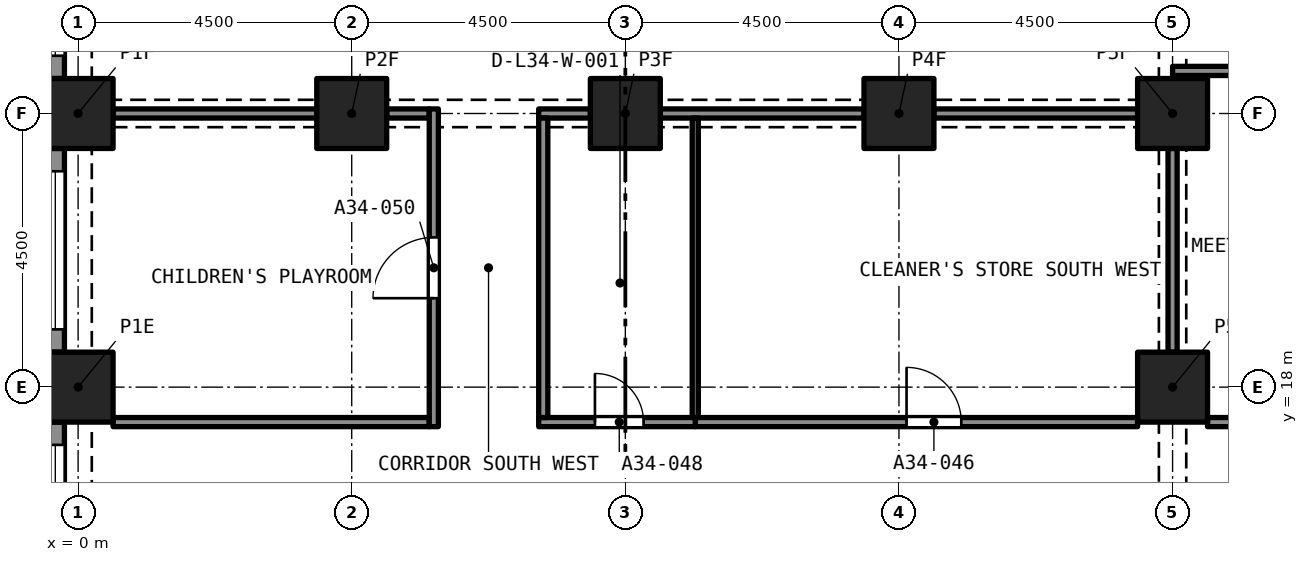
"""IFC4 building model, lengths in metres.
Left out: names, types, materials, properties, quantities, classifications, styles, units other than length and angle.
Written with IfcOpenShell. Run it as: python <this file> out.ifc"""

import sys

from ifc_helpers import new_model, si_unit, direction, frame, frame_2d, origin, origin_2d, place, context, subcontext, project, spatial, rectangle, extrude, element, fill, save


model = new_model("IFC4")
c1 = context("Model", 3, precision=1e-05, world=origin(), true_north=direction((0.0, 1.0)))
c2 = subcontext(c1, "Body", "Model", "MODEL_VIEW")
j1 = project(units=[si_unit("LENGTHUNIT", "METRE"), si_unit("PLANEANGLEUNIT", "RADIAN")], contexts=[c1])
p1 = place(None, origin())
s1 = spatial("IfcSite", under=j1, at=p1, CompositionType="ELEMENT")
p2 = place(p1, origin())
s2 = spatial("IfcBuilding", under=s1, at=p2, CompositionType="ELEMENT")
p3 = place(p2, frame((0.0, 0.0, 121.6)))
s3 = spatial("IfcBuildingStorey", under=s2, at=p3, CompositionType="ELEMENT", Elevation=121.6)
for number, where, z_axis, x_axis in (
    (1, (0.0, 18.0, 0.0), (0.0, 0.0, 1.0), (1.0, 0.0, 0.0)),
    (2, (18.0, 18.0, 0.0), (0.0, 0.0, 1.0), (1.0, 0.0, 0.0)),
    (3, (0.0, 22.5, 0.0), (0.0, 0.0, 1.0), (1.0, 0.0, 0.0)),
    (4, (4.5, 22.5, 0.0), (0.0, 0.0, 1.0), (1.0, 0.0, 0.0)),
    (5, (9.0, 22.5, 0.0), (0.0, 0.0, 1.0), (1.0, 0.0, 0.0)),
    (6, (13.5, 22.5, 0.0), (0.0, 0.0, 1.0), (1.0, 0.0, 0.0)),
    (7, (18.0, 22.5, 0.0), (0.0, 0.0, 1.0), (1.0, 0.0, 0.0)),
):
    element("IfcColumn", number, at=place(p3, frame(where, z_axis=z_axis, x_axis=x_axis)), inside=s3, PredefinedType="COLUMN", context=c2, shape_type="SweptSolid", body=[
        extrude(rectangle(XDim=1.15, YDim=1.15, at=origin_2d()), origin(), (0.0, 0.0, 1.0), 3.2),
    ])
p4 = place(p3, frame((-0.375, 23.075, 0.0), z_axis=(0.0, 0.0, 1.0), x_axis=(0.0, 1.0, 0.0)))
e8 = element("IfcWall", 8, at=p4, inside=s3, PredefinedType="SOLIDWALL", context=c2, shape_type="SweptSolid", body=[
    extrude(rectangle(XDim=3.35, YDim=0.3, at=frame_2d((1.675, 0.0))), origin(), (0.0, 0.0, 1.0), 3.2),
])
p5 = place(p4, frame((0.375, 0.0, 0.45)))
e9 = element("IfcOpeningElement", 9, at=p5, cuts=e8, PredefinedType="OPENING", context=c2, shape_type="SweptSolid", body=[
    extrude(rectangle(XDim=2.6, YDim=1.95, at=frame_2d((1.3, 0.975))), frame((0.0, 0.16, 0.0), z_axis=(0.0, -1.0, 0.0), x_axis=(1.0, 0.0, 0.0)), (0.0, 0.0, 1.0), 0.32),
])
p6 = place(p3, frame((-0.375, 18.575, 0.0), z_axis=(0.0, 0.0, 1.0), x_axis=(0.0, 1.0, 0.0)))
e10 = element("IfcWall", 10, at=p6, inside=s3, PredefinedType="SOLIDWALL", context=c2, shape_type="SweptSolid", body=[
    extrude(rectangle(XDim=3.35, YDim=0.3, at=frame_2d((1.675, 0.0))), origin(), (0.0, 0.0, 1.0), 3.2),
])
p7 = place(p6, frame((0.375, 0.0, 0.45)))
e11 = element("IfcOpeningElement", 11, at=p7, cuts=e10, PredefinedType="OPENING", context=c2, shape_type="SweptSolid", body=[
    extrude(rectangle(XDim=2.6, YDim=1.95, at=frame_2d((1.3, 0.975))), frame((0.0, 0.16, 0.0), z_axis=(0.0, -1.0, 0.0), x_axis=(1.0, 0.0, 0.0)), (0.0, 0.0, 1.0), 0.32),
])
p8 = place(p3, frame((-0.375, 14.075, 0.0), z_axis=(0.0, 0.0, 1.0), x_axis=(0.0, 1.0, 0.0)))
e12 = element("IfcWall", 12, at=p8, inside=s3, PredefinedType="SOLIDWALL", context=c2, shape_type="SweptSolid", body=[
    extrude(rectangle(XDim=3.35, YDim=0.3, at=frame_2d((1.675, 0.0))), origin(), (0.0, 0.0, 1.0), 3.2),
])
p9 = place(p8, frame((0.375, 0.0, 0.45)))
e13 = element("IfcOpeningElement", 13, at=p9, cuts=e12, PredefinedType="OPENING", context=c2, shape_type="SweptSolid", body=[
    extrude(rectangle(XDim=2.6, YDim=1.95, at=frame_2d((1.3, 0.975))), frame((0.0, 0.16, 0.0), z_axis=(0.0, -1.0, 0.0), x_axis=(1.0, 0.0, 0.0)), (0.0, 0.0, 1.0), 0.32),
])
p10 = place(p3, frame((18.575, 17.425, 0.0), z_axis=(0.0, 0.0, 1.0), x_axis=(1.0, 0.0, 0.0)))
e14 = element("IfcWall", 14, at=p10, inside=s3, PredefinedType="PARTITIONING", context=c2, shape_type="SweptSolid", body=[
    extrude(rectangle(XDim=5.2, YDim=0.15, at=frame_2d((2.6, 0.0))), origin(), (0.0, 0.0, 1.0), 2.75),
])
p11 = place(p3, frame((10.15, 17.425, 0.0), z_axis=(0.0, 0.0, 1.0), x_axis=(1.0, 0.0, 0.0)))
e15 = element("IfcWall", 15, at=p11, inside=s3, PredefinedType="PARTITIONING", context=c2, shape_type="SweptSolid", body=[
    extrude(rectangle(XDim=7.275, YDim=0.15, at=frame_2d((3.638, 0.0))), origin(), (0.0, 0.0, 1.0), 2.85),
])
p12 = place(p11, frame((3.475, 0.0, 0.0)))
e16 = element("IfcOpeningElement", 16, at=p12, cuts=e15, PredefinedType="OPENING", context=c2, shape_type="SweptSolid", body=[
    extrude(rectangle(XDim=0.9, YDim=2.1, at=frame_2d((0.45, 1.05))), frame((0.0, 0.085, 0.0), z_axis=(0.0, -1.0, 0.0), x_axis=(1.0, 0.0, 0.0)), (0.0, 0.0, 1.0), 0.17),
])
p13 = place(p3, frame((7.575, 17.425, 0.0), z_axis=(0.0, 0.0, 1.0), x_axis=(1.0, 0.0, 0.0)))
e17 = element("IfcWall", 17, at=p13, inside=s3, PredefinedType="PARTITIONING", context=c2, shape_type="SweptSolid", body=[
    extrude(rectangle(XDim=2.575, YDim=0.15, at=frame_2d((1.288, 0.0))), origin(), (0.0, 0.0, 1.0), 2.85),
])
p14 = place(p13, frame((0.925, 0.0, 0.0)))
e18 = element("IfcOpeningElement", 18, at=p14, cuts=e17, PredefinedType="OPENING", context=c2, shape_type="SweptSolid", body=[
    extrude(rectangle(XDim=0.8, YDim=2.1, at=frame_2d((0.4, 1.05))), frame((0.0, 0.085, 0.0), z_axis=(0.0, -1.0, 0.0), x_axis=(1.0, 0.0, 0.0)), (0.0, 0.0, 1.0), 0.17),
])
p15 = place(p3, frame((0.575, 17.425, 0.0), z_axis=(0.0, 0.0, 1.0), x_axis=(1.0, 0.0, 0.0)))
e19 = element("IfcWall", 19, at=p15, inside=s3, PredefinedType="PARTITIONING", context=c2, shape_type="SweptSolid", body=[
    extrude(rectangle(XDim=5.2, YDim=0.15, at=frame_2d((2.6, 0.0))), origin(), (0.0, 0.0, 1.0), 2.85),
])
p16 = place(p3, frame((18.0, 23.2, 0.0), z_axis=(0.0, 0.0, 1.0), x_axis=(1.0, 0.0, 0.0)))
e20 = element("IfcWall", 20, at=p16, inside=s3, PredefinedType="PARTITIONING", context=c2, shape_type="SweptSolid", body=[
    extrude(rectangle(XDim=5.775, YDim=0.15, at=frame_2d((2.887, 0.0))), origin(), (0.0, 0.0, 1.0), 2.75),
])
for number, where, z_axis, x_axis in (
    (21, (18.0, 18.575, 0.0), (0.0, 0.0, 1.0), (0.0, 1.0, 0.0)),
    (22, (14.075, 22.5, 0.0), (0.0, 0.0, 1.0), (1.0, 0.0, 0.0)),
    (23, (9.575, 22.5, 0.0), (0.0, 0.0, 1.0), (1.0, 0.0, 0.0)),
):
    element("IfcWall", number, at=place(p3, frame(where, z_axis=z_axis, x_axis=x_axis)), inside=s3, PredefinedType="PARTITIONING", context=c2, shape_type="SweptSolid", body=[
        extrude(rectangle(XDim=3.35, YDim=0.15, at=frame_2d((1.675, 0.0))), origin(), (0.0, 0.0, 1.0), 2.38),
    ])
p17 = place(p3, frame((7.575, 22.5, 0.0), z_axis=(0.0, 0.0, 1.0), x_axis=(1.0, 0.0, 0.0)))
e24 = element("IfcWall", 24, at=p17, inside=s3, PredefinedType="PARTITIONING", context=c2, shape_type="SweptSolid", body=[
    extrude(rectangle(XDim=0.85, YDim=0.15, at=frame_2d((0.425, 0.0))), origin(), (0.0, 0.0, 1.0), 2.38),
])
p18 = place(p3, frame((5.075, 22.5, 0.0), z_axis=(0.0, 0.0, 1.0), x_axis=(1.0, 0.0, 0.0)))
e25 = element("IfcWall", 25, at=p18, inside=s3, PredefinedType="PARTITIONING", context=c2, shape_type="SweptSolid", body=[
    extrude(rectangle(XDim=0.7, YDim=0.15, at=frame_2d((0.35, 0.0))), origin(), (0.0, 0.0, 1.0), 2.38),
])
p19 = place(p3, frame((0.575, 22.5, 0.0), z_axis=(0.0, 0.0, 1.0), x_axis=(1.0, 0.0, 0.0)))
e26 = element("IfcWall", 26, at=p19, inside=s3, PredefinedType="PARTITIONING", context=c2, shape_type="SweptSolid", body=[
    extrude(rectangle(XDim=3.35, YDim=0.15, at=frame_2d((1.675, 0.0))), origin(), (0.0, 0.0, 1.0), 2.38),
])
p20 = place(p3, frame((7.65, 17.5, 0.0), z_axis=(0.0, 0.0, 1.0), x_axis=(0.0, 1.0, 0.0)))
e27 = element("IfcWall", 27, at=p20, inside=s3, PredefinedType="PARTITIONING", context=c2, shape_type="SweptSolid", body=[
    extrude(rectangle(XDim=4.925, YDim=0.15, at=frame_2d((2.462, 0.0))), origin(), (0.0, 0.0, 1.0), 2.85),
])
p21 = place(p3, frame((5.85, 17.35, 0.0), z_axis=(0.0, 0.0, 1.0), x_axis=(0.0, 1.0, 0.0)))
e28 = element("IfcWall", 28, at=p21, inside=s3, PredefinedType="PARTITIONING", context=c2, shape_type="SweptSolid", body=[
    extrude(rectangle(XDim=5.225, YDim=0.15, at=frame_2d((2.612, 0.0))), origin(), (0.0, 0.0, 1.0), 2.85),
])
p22 = place(p21, frame((2.113, 0.0, 0.0)))
e29 = element("IfcOpeningElement", 29, at=p22, cuts=e28, PredefinedType="OPENING", context=c2, shape_type="SweptSolid", body=[
    extrude(rectangle(XDim=1.0, YDim=2.1, at=frame_2d((0.5, 1.05))), frame((0.0, 0.085, 0.0), z_axis=(0.0, -1.0, 0.0), x_axis=(1.0, 0.0, 0.0)), (0.0, 0.0, 1.0), 0.17),
])
p23 = place(p3, frame((10.15, 17.5, 0.0), z_axis=(0.0, 0.0, 1.0), x_axis=(0.0, 1.0, 0.0)))
e30 = element("IfcWall", 30, at=p23, inside=s3, PredefinedType="PARTITIONING", context=c2, shape_type="SweptSolid", body=[
    extrude(rectangle(XDim=4.925, YDim=0.1, at=frame_2d((2.462, 0.0))), origin(), (0.0, 0.0, 1.0), 2.85),
])
p24 = place(p5, origin())
e31 = element("IfcWindow", 31, at=p24, inside=s3, PartitioningType="SINGLE_PANEL", PredefinedType="WINDOW", context=c2, shape_type="SweptSolid", body=[
    extrude(rectangle(XDim=2.6, YDim=1.95, at=frame_2d((1.3, 0.975))), frame((0.0, 0.03, 0.0), z_axis=(0.0, -1.0, 0.0), x_axis=(1.0, 0.0, 0.0)), (0.0, 0.0, 1.0), 0.06),
])
fill(e9, e31)
p25 = place(p7, origin())
e32 = element("IfcWindow", 32, at=p25, inside=s3, PartitioningType="SINGLE_PANEL", PredefinedType="WINDOW", context=c2, shape_type="SweptSolid", body=[
    extrude(rectangle(XDim=2.6, YDim=1.95, at=frame_2d((1.3, 0.975))), frame((0.0, 0.03, 0.0), z_axis=(0.0, -1.0, 0.0), x_axis=(1.0, 0.0, 0.0)), (0.0, 0.0, 1.0), 0.06),
])
fill(e11, e32)
p26 = place(p9, origin())
e33 = element("IfcWindow", 33, at=p26, inside=s3, PartitioningType="SINGLE_PANEL", PredefinedType="WINDOW", context=c2, shape_type="SweptSolid", body=[
    extrude(rectangle(XDim=2.6, YDim=1.95, at=frame_2d((1.3, 0.975))), frame((0.0, 0.03, 0.0), z_axis=(0.0, -1.0, 0.0), x_axis=(1.0, 0.0, 0.0)), (0.0, 0.0, 1.0), 0.06),
])
fill(e13, e33)
p27 = place(p12, origin())
e34 = element("IfcDoor", 34, at=p27, inside=s3, OperationType="SINGLE_SWING_RIGHT", PredefinedType="DOOR", context=c2, shape_type="SweptSolid", body=[
    extrude(rectangle(XDim=0.9, YDim=2.1, at=frame_2d((0.45, 1.05))), frame((0.0, 0.025, 0.0), z_axis=(0.0, -1.0, 0.0), x_axis=(1.0, 0.0, 0.0)), (0.0, 0.0, 1.0), 0.05),
])
fill(e16, e34)
p28 = place(p14, origin())
e35 = element("IfcDoor", 35, at=p28, inside=s3, OperationType="SINGLE_SWING_RIGHT", PredefinedType="DOOR", context=c2, shape_type="SweptSolid", body=[
    extrude(rectangle(XDim=0.8, YDim=2.1, at=frame_2d((0.4, 1.05))), frame((0.0, 0.025, 0.0), z_axis=(0.0, -1.0, 0.0), x_axis=(1.0, 0.0, 0.0)), (0.0, 0.0, 1.0), 0.05),
])
fill(e18, e35)
p29 = place(p22, origin())
e36 = element("IfcDoor", 36, at=p29, inside=s3, OperationType="SINGLE_SWING_LEFT", PredefinedType="DOOR", context=c2, shape_type="SweptSolid", body=[
    extrude(rectangle(XDim=1.0, YDim=2.1, at=frame_2d((0.5, 1.05))), frame((0.0, 0.025, 0.0), z_axis=(0.0, -1.0, 0.0), x_axis=(1.0, 0.0, 0.0)), (0.0, 0.0, 1.0), 0.05),
])
fill(e29, e36)
save(model, sys.argv[1])
